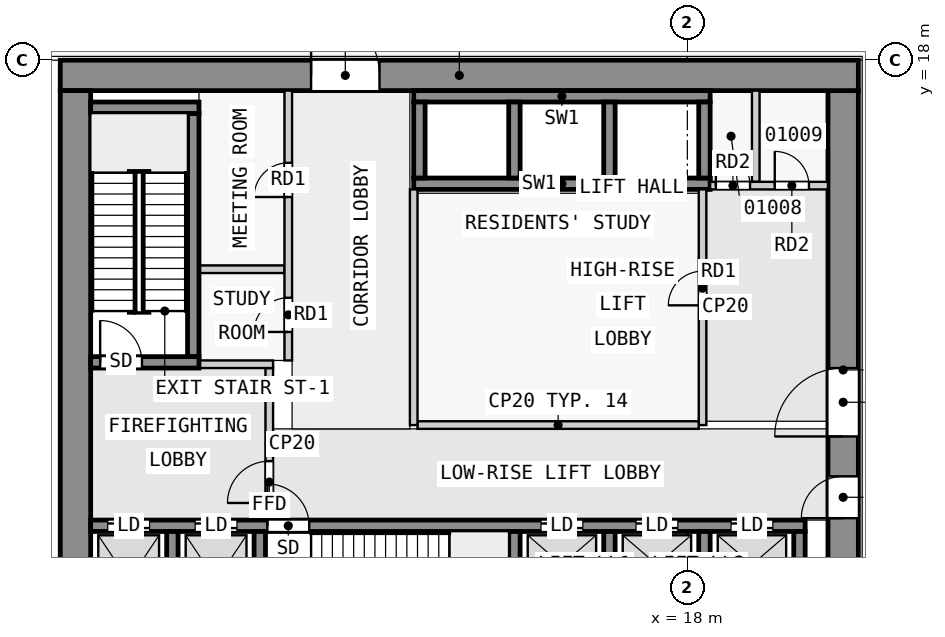
"""IFC4 building model, lengths in metres.
Left out: names, types, materials, properties, quantities, classifications, styles, units other than length and angle.
Written with IfcOpenShell. Run it as: python <this file> out.ifc"""

import sys

from ifc_helpers import new_model, si_unit, direction, frame, frame_2d, origin, place, context, subcontext, project, spatial, rectangle, extrude, element, fill, save


model = new_model("IFC4")
c1 = context("Model", 3, precision=1e-05, world=origin(), true_north=direction((0.0, 1.0)))
c2 = subcontext(c1, "Body", "Model", "MODEL_VIEW")
j1 = project(units=[si_unit("LENGTHUNIT", "METRE"), si_unit("PLANEANGLEUNIT", "RADIAN")], contexts=[c1])
p1 = place(None, origin())
s1 = spatial("IfcSite", under=j1, at=p1, CompositionType="ELEMENT")
p2 = place(p1, origin())
s2 = spatial("IfcBuilding", under=s1, at=p2, CompositionType="ELEMENT")
p3 = place(p2, frame((0.0, 0.0, 8.0)))
s3 = spatial("IfcBuildingStorey", under=s2, at=p3, CompositionType="ELEMENT", Elevation=8.0)
p4 = place(p3, frame((1.5, 17.6, 0.0), z_axis=(0.0, 0.0, 1.0), x_axis=(1.0, 0.0, 0.0)))
e1 = element("IfcWall", 1, at=p4, inside=s3, PredefinedType="SHEAR", context=c2, shape_type="SweptSolid", body=[
    extrude(rectangle(XDim=21.0, YDim=0.8, at=frame_2d((10.5, 0.0))), origin(), (0.0, 0.0, 1.0), 4.45),
])
p5 = place(p4, frame((6.6, 0.0, 0.0)))
e2 = element("IfcOpeningElement", 2, at=p5, cuts=e1, PredefinedType="OPENING", context=c2, shape_type="SweptSolid", body=[
    extrude(rectangle(XDim=1.8, YDim=2.1, at=frame_2d((0.9, 1.05))), frame((0.0, 0.41, 0.0), z_axis=(0.0, -1.0, 0.0), x_axis=(1.0, 0.0, 0.0)), (0.0, 0.0, 1.0), 0.82),
])
p6 = place(p3, frame((1.9, 2.5, 0.0), z_axis=(0.0, 0.0, 1.0), x_axis=(0.0, 1.0, 0.0)))
e3 = element("IfcWall", 3, at=p6, inside=s3, PredefinedType="SHEAR", context=c2, shape_type="SweptSolid", body=[
    extrude(rectangle(XDim=14.7, YDim=0.8, at=frame_2d((7.35, 0.0))), origin(), (0.0, 0.0, 1.0), 4.45),
])
p7 = place(p3, frame((22.1, 2.5, 0.0), z_axis=(0.0, 0.0, 1.0), x_axis=(0.0, 1.0, 0.0)))
e4 = element("IfcWall", 4, at=p7, inside=s3, PredefinedType="SHEAR", context=c2, shape_type="SweptSolid", body=[
    extrude(rectangle(XDim=14.7, YDim=0.8, at=frame_2d((7.35, 0.0))), origin(), (0.0, 0.0, 1.0), 4.45),
])
p8 = place(p7, frame((5.6, 0.0, 0.0)))
e5 = element("IfcOpeningElement", 5, at=p8, cuts=e4, PredefinedType="OPENING", context=c2, shape_type="SweptSolid", body=[
    extrude(rectangle(XDim=1.8, YDim=2.1, at=frame_2d((0.9, 1.05))), frame((0.0, 0.41, 0.0), z_axis=(0.0, -1.0, 0.0), x_axis=(1.0, 0.0, 0.0)), (0.0, 0.0, 1.0), 0.82),
])
p9 = place(p7, frame((3.45, 0.0, 0.0)))
e6 = element("IfcOpeningElement", 6, at=p9, cuts=e4, PredefinedType="OPENING", context=c2, shape_type="SweptSolid", body=[
    extrude(rectangle(XDim=1.1, YDim=2.1, at=frame_2d((0.55, 1.05))), frame((0.0, 0.41, 0.0), z_axis=(0.0, -1.0, 0.0), x_axis=(1.0, 0.0, 0.0)), (0.0, 0.0, 1.0), 0.82),
])
for number, where, z_axis, x_axis in (
    (7, (4.45, 2.8, 0.0), (0.0, 0.0, 1.0), (0.0, 1.0, 0.0)),
    (8, (6.75, 2.8, 0.0), (0.0, 0.0, 1.0), (0.0, 1.0, 0.0)),
    (9, (13.45, 2.8, 0.0), (0.0, 0.0, 1.0), (0.0, 1.0, 0.0)),
    (10, (15.95, 2.8, 0.0), (0.0, 0.0, 1.0), (0.0, 1.0, 0.0)),
    (11, (18.45, 2.8, 0.0), (0.0, 0.0, 1.0), (0.0, 1.0, 0.0)),
    (12, (20.95, 2.8, 0.0), (0.0, 0.0, 1.0), (0.0, 1.0, 0.0)),
):
    element("IfcWall", number, at=place(p3, frame(where, z_axis=z_axis, x_axis=x_axis)), inside=s3, PredefinedType="SHEAR", context=c2, shape_type="SweptSolid", body=[
        extrude(rectangle(XDim=2.8, YDim=0.3, at=frame_2d((1.4, 0.0))), origin(), (0.0, 0.0, 1.0), 4.45),
    ])
p10 = place(p3, frame((2.3, 5.75, 0.0), z_axis=(0.0, 0.0, 1.0), x_axis=(1.0, 0.0, 0.0)))
e13 = element("IfcWall", 13, at=p10, inside=s3, PredefinedType="SHEAR", context=c2, shape_type="SweptSolid", body=[
    extrude(rectangle(XDim=18.8, YDim=0.3, at=frame_2d((9.4, 0.0))), origin(), (0.0, 0.0, 1.0), 4.45),
])
p11 = place(p10, frame((4.65, 0.0, 0.0)))
e14 = element("IfcOpeningElement", 14, at=p11, cuts=e13, PredefinedType="OPENING", context=c2, shape_type="SweptSolid", body=[
    extrude(rectangle(XDim=1.1, YDim=2.1, at=frame_2d((0.55, 1.05))), frame((0.0, 0.16, 0.0), z_axis=(0.0, -1.0, 0.0), x_axis=(1.0, 0.0, 0.0)), (0.0, 0.0, 1.0), 0.32),
])
p12 = place(p10, frame((0.45, 0.0, 0.0)))
e15 = element("IfcOpeningElement", 15, at=p12, cuts=e13, PredefinedType="OPENING", context=c2, shape_type="SweptSolid", body=[
    extrude(rectangle(XDim=1.1, YDim=2.1, at=frame_2d((0.55, 1.05))), frame((0.0, 0.16, 0.0), z_axis=(0.0, -1.0, 0.0), x_axis=(1.0, 0.0, 0.0)), (0.0, 0.0, 1.0), 0.32),
])
p13 = place(p10, frame((2.75, 0.0, 0.0)))
e16 = element("IfcOpeningElement", 16, at=p13, cuts=e13, PredefinedType="OPENING", context=c2, shape_type="SweptSolid", body=[
    extrude(rectangle(XDim=1.1, YDim=2.1, at=frame_2d((0.55, 1.05))), frame((0.0, 0.16, 0.0), z_axis=(0.0, -1.0, 0.0), x_axis=(1.0, 0.0, 0.0)), (0.0, 0.0, 1.0), 0.32),
])
p14 = place(p10, frame((11.85, 0.0, 0.0)))
e17 = element("IfcOpeningElement", 17, at=p14, cuts=e13, PredefinedType="OPENING", context=c2, shape_type="SweptSolid", body=[
    extrude(rectangle(XDim=1.1, YDim=2.1, at=frame_2d((0.55, 1.05))), frame((0.0, 0.16, 0.0), z_axis=(0.0, -1.0, 0.0), x_axis=(1.0, 0.0, 0.0)), (0.0, 0.0, 1.0), 0.32),
])
p15 = place(p10, frame((14.35, 0.0, 0.0)))
e18 = element("IfcOpeningElement", 18, at=p15, cuts=e13, PredefinedType="OPENING", context=c2, shape_type="SweptSolid", body=[
    extrude(rectangle(XDim=1.1, YDim=2.1, at=frame_2d((0.55, 1.05))), frame((0.0, 0.16, 0.0), z_axis=(0.0, -1.0, 0.0), x_axis=(1.0, 0.0, 0.0)), (0.0, 0.0, 1.0), 0.32),
])
p16 = place(p10, frame((16.85, 0.0, 0.0)))
e19 = element("IfcOpeningElement", 19, at=p16, cuts=e13, PredefinedType="OPENING", context=c2, shape_type="SweptSolid", body=[
    extrude(rectangle(XDim=1.1, YDim=2.1, at=frame_2d((0.55, 1.05))), frame((0.0, 0.16, 0.0), z_axis=(0.0, -1.0, 0.0), x_axis=(1.0, 0.0, 0.0)), (0.0, 0.0, 1.0), 0.32),
])
p17 = place(p3, frame((2.3, 10.05, 0.0), z_axis=(0.0, 0.0, 1.0), x_axis=(1.0, 0.0, 0.0)))
e20 = element("IfcWall", 20, at=p17, inside=s3, PredefinedType="SHEAR", context=c2, shape_type="SweptSolid", body=[
    extrude(rectangle(XDim=2.85, YDim=0.3, at=frame_2d((1.425, 0.0))), origin(), (0.0, 0.0, 1.0), 4.45),
])
p18 = place(p17, frame((0.25, 0.0, 0.0)))
e21 = element("IfcOpeningElement", 21, at=p18, cuts=e20, PredefinedType="OPENING", context=c2, shape_type="SweptSolid", body=[
    extrude(rectangle(XDim=1.1, YDim=2.1, at=frame_2d((0.55, 1.05))), frame((0.0, 0.16, 0.0), z_axis=(0.0, -1.0, 0.0), x_axis=(1.0, 0.0, 0.0)), (0.0, 0.0, 1.0), 0.32),
])
p19 = place(p3, frame((5.0, 10.2, 0.0), z_axis=(0.0, 0.0, 1.0), x_axis=(0.0, 1.0, 0.0)))
e22 = element("IfcWall", 22, at=p19, inside=s3, PredefinedType="SHEAR", context=c2, shape_type="SweptSolid", body=[
    extrude(rectangle(XDim=6.4, YDim=0.3, at=frame_2d((3.2, 0.0))), origin(), (0.0, 0.0, 1.0), 4.45),
])
p20 = place(p3, frame((2.3, 16.75, 0.0), z_axis=(0.0, 0.0, 1.0), x_axis=(1.0, 0.0, 0.0)))
e23 = element("IfcWall", 23, at=p20, inside=s3, PredefinedType="SHEAR", context=c2, shape_type="SweptSolid", body=[
    extrude(rectangle(XDim=2.85, YDim=0.3, at=frame_2d((1.425, 0.0))), origin(), (0.0, 0.0, 1.0), 4.45),
])
for number, where, z_axis, x_axis in (
    (24, (10.8, 17.05, 0.0), (0.0, 0.0, 1.0), (1.0, 0.0, 0.0)),
    (25, (10.8, 14.75, 0.0), (0.0, 0.0, 1.0), (1.0, 0.0, 0.0)),
):
    element("IfcWall", number, at=place(p3, frame(where, z_axis=z_axis, x_axis=x_axis)), inside=s3, PredefinedType="SHEAR", context=c2, shape_type="SweptSolid", body=[
        extrude(rectangle(XDim=7.8, YDim=0.3, at=frame_2d((3.9, 0.0))), origin(), (0.0, 0.0, 1.0), 4.45),
    ])
for number, where, z_axis, x_axis in (
    (26, (10.95, 14.9, 0.0), (0.0, 0.0, 1.0), (0.0, 1.0, 0.0)),
    (27, (13.45, 14.9, 0.0), (0.0, 0.0, 1.0), (0.0, 1.0, 0.0)),
    (28, (15.95, 14.9, 0.0), (0.0, 0.0, 1.0), (0.0, 1.0, 0.0)),
    (29, (18.45, 14.9, 0.0), (0.0, 0.0, 1.0), (0.0, 1.0, 0.0)),
):
    element("IfcWall", number, at=place(p3, frame(where, z_axis=z_axis, x_axis=x_axis)), inside=s3, PredefinedType="SHEAR", context=c2, shape_type="SweptSolid", body=[
        extrude(rectangle(XDim=2.0, YDim=0.3, at=frame_2d((1.0, 0.0))), origin(), (0.0, 0.0, 1.0), 4.45),
    ])
p21 = place(p3, frame((7.0, 5.9, 0.0), z_axis=(0.0, 0.0, 1.0), x_axis=(0.0, 1.0, 0.0)))
e30 = element("IfcWall", 30, at=p21, inside=s3, PredefinedType="PARTITIONING", context=c2, shape_type="SweptSolid", body=[
    extrude(rectangle(XDim=4.0, YDim=0.2, at=frame_2d((2.0, 0.0))), origin(), (0.0, 0.0, 1.0), 4.45),
])
p22 = place(p21, frame((0.45, 0.0, 0.0)))
e31 = element("IfcOpeningElement", 31, at=p22, cuts=e30, PredefinedType="OPENING", context=c2, shape_type="SweptSolid", body=[
    extrude(rectangle(XDim=1.1, YDim=2.1, at=frame_2d((0.55, 1.05))), frame((0.0, 0.11, 0.0), z_axis=(0.0, -1.0, 0.0), x_axis=(1.0, 0.0, 0.0)), (0.0, 0.0, 1.0), 0.22),
])
p23 = place(p3, frame((5.15, 10.0, 0.0), z_axis=(0.0, 0.0, 1.0), x_axis=(1.0, 0.0, 0.0)))
e32 = element("IfcWall", 32, at=p23, inside=s3, PredefinedType="PARTITIONING", context=c2, shape_type="SweptSolid", body=[
    extrude(rectangle(XDim=1.95, YDim=0.2, at=frame_2d((0.975, 0.0))), origin(), (0.0, 0.0, 1.0), 4.45),
])
p24 = place(p3, frame((10.8, 8.4, 0.0), z_axis=(0.0, 0.0, 1.0), x_axis=(0.0, 1.0, 0.0)))
e33 = element("IfcWall", 33, at=p24, inside=s3, PredefinedType="PARTITIONING", context=c2, shape_type="SweptSolid", body=[
    extrude(rectangle(XDim=6.2, YDim=0.2, at=frame_2d((3.1, 0.0))), origin(), (0.0, 0.0, 1.0), 4.45),
])
p25 = place(p3, frame((10.9, 8.4, 0.0), z_axis=(0.0, 0.0, 1.0), x_axis=(1.0, 0.0, 0.0)))
e34 = element("IfcWall", 34, at=p25, inside=s3, PredefinedType="PARTITIONING", context=c2, shape_type="SweptSolid", body=[
    extrude(rectangle(XDim=7.4, YDim=0.2, at=frame_2d((3.7, 0.0))), origin(), (0.0, 0.0, 1.0), 4.45),
])
p26 = place(p3, frame((18.4, 8.4, 0.0), z_axis=(0.0, 0.0, 1.0), x_axis=(0.0, 1.0, 0.0)))
e35 = element("IfcWall", 35, at=p26, inside=s3, PredefinedType="PARTITIONING", context=c2, shape_type="SweptSolid", body=[
    extrude(rectangle(XDim=6.2, YDim=0.2, at=frame_2d((3.1, 0.0))), origin(), (0.0, 0.0, 1.0), 4.45),
])
p27 = place(p26, frame((3.15, 0.0, 0.0)))
e36 = element("IfcOpeningElement", 36, at=p27, cuts=e35, PredefinedType="OPENING", context=c2, shape_type="SweptSolid", body=[
    extrude(rectangle(XDim=0.9, YDim=2.1, at=frame_2d((0.45, 1.05))), frame((0.0, 0.11, 0.0), z_axis=(0.0, -1.0, 0.0), x_axis=(1.0, 0.0, 0.0)), (0.0, 0.0, 1.0), 0.22),
])
p28 = place(p3, frame((7.5, 10.1, 0.0), z_axis=(0.0, 0.0, 1.0), x_axis=(0.0, 1.0, 0.0)))
e37 = element("IfcWall", 37, at=p28, inside=s3, PredefinedType="PARTITIONING", context=c2, shape_type="SweptSolid", body=[
    extrude(rectangle(XDim=7.1, YDim=0.2, at=frame_2d((3.55, 0.0))), origin(), (0.0, 0.0, 1.0), 4.45),
])
p29 = place(p28, frame((0.75, 0.0, 0.0)))
e38 = element("IfcOpeningElement", 38, at=p29, cuts=e37, PredefinedType="OPENING", context=c2, shape_type="SweptSolid", body=[
    extrude(rectangle(XDim=0.9, YDim=2.1, at=frame_2d((0.45, 1.05))), frame((0.0, 0.11, 0.0), z_axis=(0.0, -1.0, 0.0), x_axis=(1.0, 0.0, 0.0)), (0.0, 0.0, 1.0), 0.22),
])
p30 = place(p28, frame((4.3, 0.0, 0.0)))
e39 = element("IfcOpeningElement", 39, at=p30, cuts=e37, PredefinedType="OPENING", context=c2, shape_type="SweptSolid", body=[
    extrude(rectangle(XDim=0.9, YDim=2.1, at=frame_2d((0.45, 1.05))), frame((0.0, 0.11, 0.0), z_axis=(0.0, -1.0, 0.0), x_axis=(1.0, 0.0, 0.0)), (0.0, 0.0, 1.0), 0.22),
])
p31 = place(p3, frame((5.15, 12.5, 0.0), z_axis=(0.0, 0.0, 1.0), x_axis=(1.0, 0.0, 0.0)))
e40 = element("IfcWall", 40, at=p31, inside=s3, PredefinedType="PARTITIONING", context=c2, shape_type="SweptSolid", body=[
    extrude(rectangle(XDim=2.25, YDim=0.2, at=frame_2d((1.125, 0.0))), origin(), (0.0, 0.0, 1.0), 4.45),
])
p32 = place(p3, frame((18.6, 14.7, 0.0), z_axis=(0.0, 0.0, 1.0), x_axis=(1.0, 0.0, 0.0)))
e41 = element("IfcWall", 41, at=p32, inside=s3, PredefinedType="PARTITIONING", context=c2, shape_type="SweptSolid", body=[
    extrude(rectangle(XDim=3.1, YDim=0.2, at=frame_2d((1.55, 0.0))), origin(), (0.0, 0.0, 1.0), 4.45),
])
p33 = place(p32, frame((0.15, 0.0, 0.0)))
e42 = element("IfcOpeningElement", 42, at=p33, cuts=e41, PredefinedType="OPENING", context=c2, shape_type="SweptSolid", body=[
    extrude(rectangle(XDim=0.9, YDim=2.1, at=frame_2d((0.45, 1.05))), frame((0.0, 0.11, 0.0), z_axis=(0.0, -1.0, 0.0), x_axis=(1.0, 0.0, 0.0)), (0.0, 0.0, 1.0), 0.22),
])
p34 = place(p32, frame((1.7, 0.0, 0.0)))
e43 = element("IfcOpeningElement", 43, at=p34, cuts=e41, PredefinedType="OPENING", context=c2, shape_type="SweptSolid", body=[
    extrude(rectangle(XDim=0.9, YDim=2.1, at=frame_2d((0.45, 1.05))), frame((0.0, 0.11, 0.0), z_axis=(0.0, -1.0, 0.0), x_axis=(1.0, 0.0, 0.0)), (0.0, 0.0, 1.0), 0.22),
])
p35 = place(p3, frame((19.8, 14.8, 0.0), z_axis=(0.0, 0.0, 1.0), x_axis=(0.0, 1.0, 0.0)))
e44 = element("IfcWall", 44, at=p35, inside=s3, PredefinedType="PARTITIONING", context=c2, shape_type="SweptSolid", body=[
    extrude(rectangle(XDim=2.4, YDim=0.2, at=frame_2d((1.2, 0.0))), origin(), (0.0, 0.0, 1.0), 4.45),
])
p36 = place(p22, origin())
e45 = element("IfcDoor", 45, at=p36, inside=s3, OperationType="SINGLE_SWING_LEFT", PredefinedType="DOOR", context=c2, shape_type="SweptSolid", body=[
    extrude(rectangle(XDim=1.1, YDim=2.1, at=frame_2d((0.55, 1.05))), frame((0.0, 0.025, 0.0), z_axis=(0.0, -1.0, 0.0), x_axis=(1.0, 0.0, 0.0)), (0.0, 0.0, 1.0), 0.05),
])
fill(e31, e45)
p37 = place(p18, origin())
e46 = element("IfcDoor", 46, at=p37, inside=s3, OperationType="SINGLE_SWING_RIGHT", PredefinedType="DOOR", context=c2, shape_type="SweptSolid", body=[
    extrude(rectangle(XDim=1.1, YDim=2.1, at=frame_2d((0.55, 1.05))), frame((0.0, 0.025, 0.0), z_axis=(0.0, -1.0, 0.0), x_axis=(1.0, 0.0, 0.0)), (0.0, 0.0, 1.0), 0.05),
])
fill(e21, e46)
p38 = place(p27, origin())
e47 = element("IfcDoor", 47, at=p38, inside=s3, OperationType="SINGLE_SWING_LEFT", PredefinedType="DOOR", context=c2, shape_type="SweptSolid", body=[
    extrude(rectangle(XDim=0.9, YDim=2.1, at=frame_2d((0.45, 1.05))), frame((0.0, 0.025, 0.0), z_axis=(0.0, -1.0, 0.0), x_axis=(1.0, 0.0, 0.0)), (0.0, 0.0, 1.0), 0.05),
])
fill(e36, e47)
p39 = place(p11, origin())
e48 = element("IfcDoor", 48, at=p39, inside=s3, OperationType="SINGLE_SWING_LEFT", PredefinedType="DOOR", context=c2, shape_type="SweptSolid", body=[
    extrude(rectangle(XDim=1.1, YDim=2.1, at=frame_2d((0.55, 1.05))), frame((0.0, 0.025, 0.0), z_axis=(0.0, -1.0, 0.0), x_axis=(1.0, 0.0, 0.0)), (0.0, 0.0, 1.0), 0.05),
])
fill(e14, e48)
p40 = place(p12, origin())
e49 = element("IfcDoor", 49, at=p40, inside=s3, OperationType="DOUBLE_DOOR_SLIDING", PredefinedType="DOOR", context=c2, shape_type="SweptSolid", body=[
    extrude(rectangle(XDim=1.1, YDim=2.1, at=frame_2d((0.55, 1.05))), frame((0.0, 0.025, 0.0), z_axis=(0.0, -1.0, 0.0), x_axis=(1.0, 0.0, 0.0)), (0.0, 0.0, 1.0), 0.05),
])
fill(e15, e49)
p41 = place(p13, origin())
e50 = element("IfcDoor", 50, at=p41, inside=s3, OperationType="DOUBLE_DOOR_SLIDING", PredefinedType="DOOR", context=c2, shape_type="SweptSolid", body=[
    extrude(rectangle(XDim=1.1, YDim=2.1, at=frame_2d((0.55, 1.05))), frame((0.0, 0.025, 0.0), z_axis=(0.0, -1.0, 0.0), x_axis=(1.0, 0.0, 0.0)), (0.0, 0.0, 1.0), 0.05),
])
fill(e16, e50)
p42 = place(p14, origin())
e51 = element("IfcDoor", 51, at=p42, inside=s3, OperationType="DOUBLE_DOOR_SLIDING", PredefinedType="DOOR", context=c2, shape_type="SweptSolid", body=[
    extrude(rectangle(XDim=1.1, YDim=2.1, at=frame_2d((0.55, 1.05))), frame((0.0, 0.025, 0.0), z_axis=(0.0, -1.0, 0.0), x_axis=(1.0, 0.0, 0.0)), (0.0, 0.0, 1.0), 0.05),
])
fill(e17, e51)
p43 = place(p15, origin())
e52 = element("IfcDoor", 52, at=p43, inside=s3, OperationType="DOUBLE_DOOR_SLIDING", PredefinedType="DOOR", context=c2, shape_type="SweptSolid", body=[
    extrude(rectangle(XDim=1.1, YDim=2.1, at=frame_2d((0.55, 1.05))), frame((0.0, 0.025, 0.0), z_axis=(0.0, -1.0, 0.0), x_axis=(1.0, 0.0, 0.0)), (0.0, 0.0, 1.0), 0.05),
])
fill(e18, e52)
p44 = place(p16, origin())
e53 = element("IfcDoor", 53, at=p44, inside=s3, OperationType="DOUBLE_DOOR_SLIDING", PredefinedType="DOOR", context=c2, shape_type="SweptSolid", body=[
    extrude(rectangle(XDim=1.1, YDim=2.1, at=frame_2d((0.55, 1.05))), frame((0.0, 0.025, 0.0), z_axis=(0.0, -1.0, 0.0), x_axis=(1.0, 0.0, 0.0)), (0.0, 0.0, 1.0), 0.05),
])
fill(e19, e53)
p45 = place(p8, origin())
e54 = element("IfcDoor", 54, at=p45, inside=s3, OperationType="DOUBLE_DOOR_SINGLE_SWING", PredefinedType="DOOR", context=c2, shape_type="SweptSolid", body=[
    extrude(rectangle(XDim=1.8, YDim=2.1, at=frame_2d((0.9, 1.05))), frame((0.0, 0.025, 0.0), z_axis=(0.0, -1.0, 0.0), x_axis=(1.0, 0.0, 0.0)), (0.0, 0.0, 1.0), 0.05),
])
fill(e5, e54)
p46 = place(p9, origin())
e55 = element("IfcDoor", 55, at=p46, inside=s3, OperationType="SINGLE_SWING_RIGHT", PredefinedType="DOOR", context=c2, shape_type="SweptSolid", body=[
    extrude(rectangle(XDim=1.1, YDim=2.1, at=frame_2d((0.55, 1.05))), frame((0.0, 0.025, 0.0), z_axis=(0.0, -1.0, 0.0), x_axis=(1.0, 0.0, 0.0)), (0.0, 0.0, 1.0), 0.05),
])
fill(e6, e55)
p47 = place(p5, origin())
e56 = element("IfcDoor", 56, at=p47, inside=s3, OperationType="DOUBLE_DOOR_SINGLE_SWING", PredefinedType="DOOR", context=c2, shape_type="SweptSolid", body=[
    extrude(rectangle(XDim=1.8, YDim=2.1, at=frame_2d((0.9, 1.05))), frame((0.0, 0.025, 0.0), z_axis=(0.0, -1.0, 0.0), x_axis=(1.0, 0.0, 0.0)), (0.0, 0.0, 1.0), 0.05),
])
fill(e2, e56)
p48 = place(p29, origin())
e57 = element("IfcDoor", 57, at=p48, inside=s3, OperationType="SINGLE_SWING_RIGHT", PredefinedType="DOOR", context=c2, shape_type="SweptSolid", body=[
    extrude(rectangle(XDim=0.9, YDim=2.1, at=frame_2d((0.45, 1.05))), frame((0.0, 0.025, 0.0), z_axis=(0.0, -1.0, 0.0), x_axis=(1.0, 0.0, 0.0)), (0.0, 0.0, 1.0), 0.05),
])
fill(e38, e57)
p49 = place(p30, origin())
e58 = element("IfcDoor", 58, at=p49, inside=s3, OperationType="SINGLE_SWING_RIGHT", PredefinedType="DOOR", context=c2, shape_type="SweptSolid", body=[
    extrude(rectangle(XDim=0.9, YDim=2.1, at=frame_2d((0.45, 1.05))), frame((0.0, 0.025, 0.0), z_axis=(0.0, -1.0, 0.0), x_axis=(1.0, 0.0, 0.0)), (0.0, 0.0, 1.0), 0.05),
])
fill(e39, e58)
p50 = place(p33, origin())
e59 = element("IfcDoor", 59, at=p50, inside=s3, OperationType="SINGLE_SWING_LEFT", PredefinedType="DOOR", context=c2, shape_type="SweptSolid", body=[
    extrude(rectangle(XDim=0.9, YDim=2.1, at=frame_2d((0.45, 1.05))), frame((0.0, 0.025, 0.0), z_axis=(0.0, -1.0, 0.0), x_axis=(1.0, 0.0, 0.0)), (0.0, 0.0, 1.0), 0.05),
])
fill(e42, e59)
p51 = place(p34, origin())
e60 = element("IfcDoor", 60, at=p51, inside=s3, OperationType="SINGLE_SWING_LEFT", PredefinedType="DOOR", context=c2, shape_type="SweptSolid", body=[
    extrude(rectangle(XDim=0.9, YDim=2.1, at=frame_2d((0.45, 1.05))), frame((0.0, 0.025, 0.0), z_axis=(0.0, -1.0, 0.0), x_axis=(1.0, 0.0, 0.0)), (0.0, 0.0, 1.0), 0.05),
])
fill(e43, e60)
save(model, sys.argv[1])
